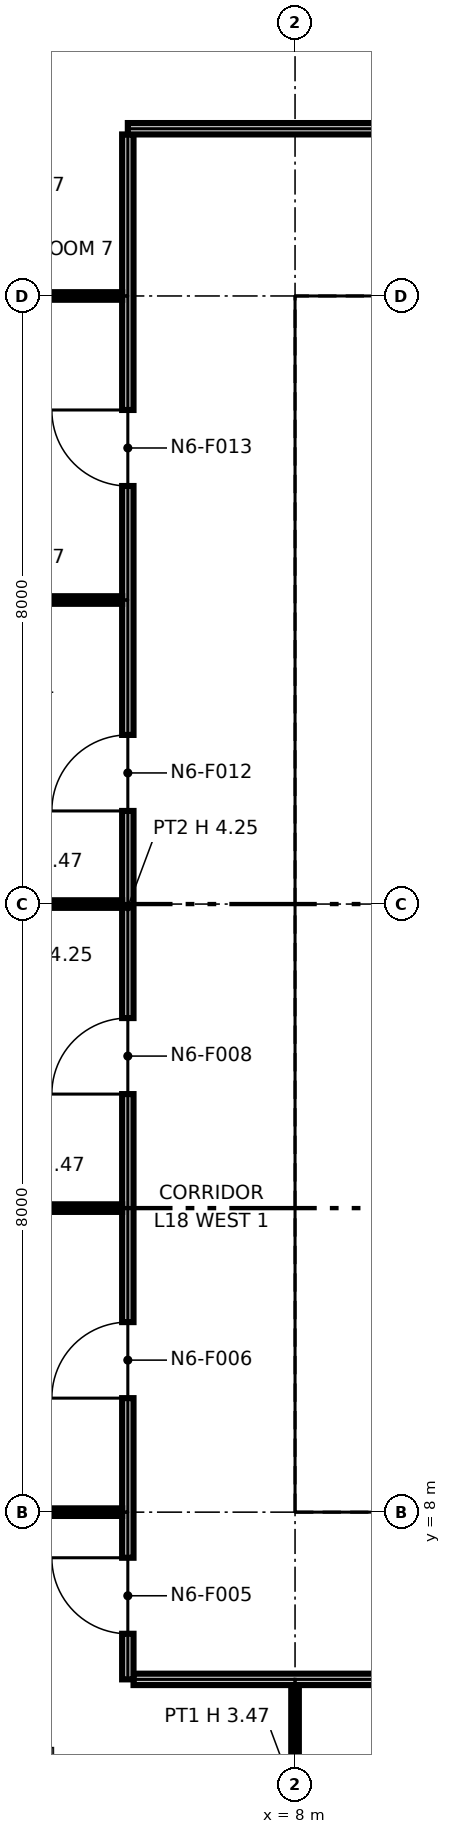
"""IFC4 building model, lengths in metres.
Left out: names, types, materials, properties, quantities, classifications, styles, units other than length and angle.
Written with IfcOpenShell. Run it as: python <this file> out.ifc"""

import sys

from ifc_helpers import new_model, si_unit, direction, frame, frame_2d, origin, origin_2d, place, context, subcontext, project, spatial, polyline, rectangle, i_section, outline, extrude, element, fill, save


model = new_model("IFC4")
c1 = context("Model", 3, precision=1e-05, world=origin(), true_north=direction((0.0, 1.0)))
c2 = subcontext(c1, "Body", "Model", "MODEL_VIEW")
j1 = project(units=[si_unit("LENGTHUNIT", "METRE"), si_unit("PLANEANGLEUNIT", "RADIAN")], contexts=[c1])
p1 = place(None, origin())
s1 = spatial("IfcSite", under=j1, at=p1, CompositionType="ELEMENT")
p2 = place(p1, origin())
s2 = spatial("IfcBuilding", under=s1, at=p2, CompositionType="ELEMENT")
p3 = place(p2, frame((0.0, 0.0, 96.4)))
s3 = spatial("IfcBuildingStorey", under=s2, at=p3, CompositionType="ELEMENT", Elevation=96.4)
for number, where, z_axis, x_axis in (
    (1, (8.0, 8.0, 0.0), (0.0, 0.0, 1.0), (1.0, 0.0, 0.0)),
    (2, (8.0, 16.0, 0.0), (0.0, 0.0, 1.0), (1.0, 0.0, 0.0)),
):
    element("IfcColumn", number, at=place(p3, frame(where, z_axis=z_axis, x_axis=x_axis)), inside=s3, PredefinedType="COLUMN", context=c2, shape_type="SweptSolid", body=[
        extrude(i_section(OverallWidth=0.406, OverallDepth=0.417, WebThickness=0.03, FlangeThickness=0.048, at=origin_2d()), origin(), (0.0, 0.0, 1.0), 4.25),
    ])
p4 = place(p3, frame((8.0, 24.0, 0.0), z_axis=(0.0, 0.0, 1.0), x_axis=(1.0, 0.0, 0.0)))
e3 = element("IfcColumn", 3, at=p4, inside=s3, PredefinedType="COLUMN", context=c2, shape_type="SweptSolid", body=[
    extrude(i_section(OverallWidth=0.411, OverallDepth=0.434, WebThickness=0.036, FlangeThickness=0.057, at=origin_2d()), origin(), (0.0, 0.0, 1.0), 4.25),
])
p5 = place(p3, frame((8.65, 8.75, 0.0), z_axis=(0.0, 0.0, 1.0), x_axis=(1.0, 0.0, 0.0)))
e4 = element("IfcWall", 4, at=p5, inside=s3, PredefinedType="PARTITIONING", context=c2, shape_type="SweptSolid", body=[
    extrude(outline(polyline([(0.0, 0.0), (14.7, 0.0), (14.7, 4.25), (7.469, 4.25), (7.469, 3.632), (7.231, 3.632), (7.23, 4.25), (0.0, 4.25), (0.0, 0.0)])), frame((0.0, 0.1, 0.0), z_axis=(0.0, -1.0, 0.0), x_axis=(1.0, 0.0, 0.0)), (0.0, 0.0, 1.0), 0.2),
])
p6 = place(p5, frame((1.3, 0.0, 0.0)))
e5 = element("IfcOpeningElement", 5, at=p6, cuts=e4, PredefinedType="OPENING", context=c2, shape_type="SweptSolid", body=[
    extrude(rectangle(XDim=1.4, YDim=2.1, at=frame_2d((0.7, 1.05))), frame((0.0, 0.11, 0.0), z_axis=(0.0, -1.0, 0.0), x_axis=(1.0, 0.0, 0.0)), (0.0, 0.0, 1.0), 0.22),
])
p7 = place(p5, frame((4.6, 0.0, 0.0)))
e6 = element("IfcOpeningElement", 6, at=p7, cuts=e4, PredefinedType="OPENING", context=c2, shape_type="SweptSolid", body=[
    extrude(rectangle(XDim=1.4, YDim=2.1, at=frame_2d((0.7, 1.05))), frame((0.0, 0.11, 0.0), z_axis=(0.0, -1.0, 0.0), x_axis=(1.0, 0.0, 0.0)), (0.0, 0.0, 1.0), 0.22),
])
p8 = place(p5, frame((10.4, 0.0, 0.0)))
e7 = element("IfcOpeningElement", 7, at=p8, cuts=e4, PredefinedType="OPENING", context=c2, shape_type="SweptSolid", body=[
    extrude(rectangle(XDim=1.2, YDim=2.1, at=frame_2d((0.6, 1.05))), frame((0.0, 0.11, 0.0), z_axis=(0.0, -1.0, 0.0), x_axis=(1.0, 0.0, 0.0)), (0.0, 0.0, 1.0), 0.22),
])
p9 = place(p3, frame((8.75, 8.85, 0.0), z_axis=(0.0, 0.0, 1.0), x_axis=(0.0, 1.0, 0.0)))
e8 = element("IfcWall", 8, at=p9, inside=s3, PredefinedType="PARTITIONING", context=c2, shape_type="SweptSolid", body=[
    extrude(outline(polyline([(0.0, 0.0), (14.3, 0.0), (14.3, 4.25), (10.231, 4.25), (10.23, 3.789), (10.07, 3.789), (10.069, 4.25), (7.27, 4.25), (7.269, 3.632), (7.031, 3.632), (7.031, 4.25), (0.0, 4.25), (0.0, 0.0)])), frame((0.0, 0.1, 0.0), z_axis=(0.0, -1.0, 0.0), x_axis=(1.0, 0.0, 0.0)), (0.0, 0.0, 1.0), 0.2),
])
p10 = place(p9, frame((8.3, 0.0, 0.0)))
e9 = element("IfcOpeningElement", 9, at=p10, cuts=e8, PredefinedType="OPENING", context=c2, shape_type="SweptSolid", body=[
    extrude(rectangle(XDim=1.8, YDim=2.1, at=frame_2d((0.9, 1.05))), frame((0.0, 0.11, 0.0), z_axis=(0.0, -1.0, 0.0), x_axis=(1.0, 0.0, 0.0)), (0.0, 0.0, 1.0), 0.22),
])
p11 = place(p3, frame((8.65, 23.25, 0.0), z_axis=(0.0, 0.0, 1.0), x_axis=(1.0, 0.0, 0.0)))
e10 = element("IfcWall", 10, at=p11, inside=s3, PredefinedType="PARTITIONING", context=c2, shape_type="SweptSolid", body=[
    extrude(outline(polyline([(0.0, 0.0), (14.7, 0.0), (14.7, 4.25), (7.469, 4.25), (7.469, 3.632), (7.231, 3.632), (7.23, 4.25), (0.0, 4.25), (0.0, 0.0)])), frame((0.0, 0.1, 0.0), z_axis=(0.0, -1.0, 0.0), x_axis=(1.0, 0.0, 0.0)), (0.0, 0.0, 1.0), 0.2),
])
p12 = place(p3, frame((8.85, 16.0, 0.0), z_axis=(0.0, 0.0, 1.0), x_axis=(1.0, 0.0, 0.0)))
e11 = element("IfcWall", 11, at=p12, inside=s3, PredefinedType="PARTITIONING", context=c2, shape_type="SweptSolid", body=[
    extrude(rectangle(XDim=6.931, YDim=0.6, at=frame_2d((3.466, 0.0))), origin(), (0.0, 0.0, 1.0), 3.632),
])
p13 = place(p3, frame((8.85, 19.9, 0.0), z_axis=(0.0, 0.0, 1.0), x_axis=(1.0, 0.0, 0.0)))
e12 = element("IfcWall", 12, at=p13, inside=s3, PredefinedType="PARTITIONING", context=c2, shape_type="SweptSolid", body=[
    extrude(outline(polyline([(0.0, 0.0), (14.3, 0.0), (14.3, 3.789), (7.27, 3.789), (7.269, 3.632), (7.031, 3.632), (7.031, 4.25), (0.0, 4.25), (0.0, 0.0)])), frame((0.0, 0.1, 0.0), z_axis=(0.0, -1.0, 0.0), x_axis=(1.0, 0.0, 0.0)), (0.0, 0.0, 1.0), 0.2),
])
p14 = place(p13, frame((6.35, 0.0, 0.0)))
e13 = element("IfcOpeningElement", 13, at=p14, cuts=e12, PredefinedType="OPENING", context=c2, shape_type="SweptSolid", body=[
    extrude(rectangle(XDim=0.9, YDim=2.1, at=frame_2d((0.45, 1.05))), frame((0.0, 0.11, 0.0), z_axis=(0.0, -1.0, 0.0), x_axis=(1.0, 0.0, 0.0)), (0.0, 0.0, 1.0), 0.22),
])
p15 = place(p13, frame((9.0, 0.0, 0.0)))
e14 = element("IfcOpeningElement", 14, at=p15, cuts=e12, PredefinedType="OPENING", context=c2, shape_type="SweptSolid", body=[
    extrude(rectangle(XDim=0.9, YDim=2.1, at=frame_2d((0.45, 1.05))), frame((0.0, 0.11, 0.0), z_axis=(0.0, -1.0, 0.0), x_axis=(1.0, 0.0, 0.0)), (0.0, 0.0, 1.0), 0.22),
])
p16 = place(p13, frame((11.35, 0.0, 0.0)))
e15 = element("IfcOpeningElement", 15, at=p16, cuts=e12, PredefinedType="OPENING", context=c2, shape_type="SweptSolid", body=[
    extrude(rectangle(XDim=1.0, YDim=2.1, at=frame_2d((0.5, 1.05))), frame((0.0, 0.11, 0.0), z_axis=(0.0, -1.0, 0.0), x_axis=(1.0, 0.0, 0.0)), (0.0, 0.0, 1.0), 0.22),
])
p17 = place(p13, frame((13.125, 0.0, 0.0)))
e16 = element("IfcOpeningElement", 16, at=p17, cuts=e12, PredefinedType="OPENING", context=c2, shape_type="SweptSolid", body=[
    extrude(rectangle(XDim=0.9, YDim=2.1, at=frame_2d((0.45, 1.05))), frame((0.0, 0.11, 0.0), z_axis=(0.0, -1.0, 0.0), x_axis=(1.0, 0.0, 0.0)), (0.0, 0.0, 1.0), 0.22),
])
p18 = place(p3, frame((8.0, 2.83, 0.0), z_axis=(0.0, 0.0, 1.0), x_axis=(0.0, 1.0, 0.0)))
e17 = element("IfcWall", 17, at=p18, inside=s3, PredefinedType="PARTITIONING", context=c2, shape_type="SweptSolid", body=[
    extrude(rectangle(XDim=2.895, YDim=0.1, at=frame_2d((1.448, 0.0))), origin(), (0.0, 0.0, 1.0), 3.47),
])
p19 = place(p3, frame((5.875, 5.8, 0.0), z_axis=(0.0, 0.0, 1.0), x_axis=(1.0, 0.0, 0.0)))
e18 = element("IfcWall", 18, at=p19, inside=s3, PredefinedType="PARTITIONING", context=c2, shape_type="SweptSolid", body=[
    extrude(rectangle(XDim=20.25, YDim=0.15, at=frame_2d((10.125, 0.0))), origin(), (0.0, 0.0, 1.0), 4.25),
])
p20 = place(p19, frame((14.625, 0.0, 0.0), z_axis=(0.0, 0.0, 1.0), x_axis=(-1.0, 0.0, 0.0)))
e19 = element("IfcOpeningElement", 19, at=p20, cuts=e18, PredefinedType="OPENING", context=c2, shape_type="SweptSolid", body=[
    extrude(rectangle(XDim=1.0, YDim=2.1, at=frame_2d((0.5, 1.05))), frame((0.0, 0.085, 0.0), z_axis=(0.0, -1.0, 0.0), x_axis=(1.0, 0.0, 0.0)), (0.0, 0.0, 1.0), 0.17),
])
p21 = place(p19, frame((4.625, 0.0, 0.0), z_axis=(0.0, 0.0, 1.0), x_axis=(-1.0, 0.0, 0.0)))
e20 = element("IfcOpeningElement", 20, at=p21, cuts=e18, PredefinedType="OPENING", context=c2, shape_type="SweptSolid", body=[
    extrude(rectangle(XDim=1.0, YDim=2.1, at=frame_2d((0.5, 1.05))), frame((0.0, 0.085, 0.0), z_axis=(0.0, -1.0, 0.0), x_axis=(1.0, 0.0, 0.0)), (0.0, 0.0, 1.0), 0.17),
])
p22 = place(p19, frame((8.625, 0.0, 0.0), z_axis=(0.0, 0.0, 1.0), x_axis=(-1.0, 0.0, 0.0)))
e21 = element("IfcOpeningElement", 21, at=p22, cuts=e18, PredefinedType="OPENING", context=c2, shape_type="SweptSolid", body=[
    extrude(rectangle(XDim=1.0, YDim=2.1, at=frame_2d((0.5, 1.05))), frame((0.0, 0.085, 0.0), z_axis=(0.0, -1.0, 0.0), x_axis=(1.0, 0.0, 0.0)), (0.0, 0.0, 1.0), 0.17),
])
p23 = place(p3, frame((5.8, 5.8, 0.0), z_axis=(0.0, 0.0, 1.0), x_axis=(0.0, 1.0, 0.0)))
e22 = element("IfcWall", 22, at=p23, inside=s3, PredefinedType="PARTITIONING", context=c2, shape_type="SweptSolid", body=[
    extrude(outline(polyline([(0.0, 0.0), (20.325, 0.0), (20.325, 4.25), (18.5, 4.25), (18.498, 3.47), (17.902, 3.47), (17.9, 4.25), (14.5, 4.25), (14.498, 3.47), (13.902, 3.47), (13.9, 4.25), (10.5, 4.25), (10.498, 3.47), (9.902, 3.47), (9.9, 4.25), (6.5, 4.25), (6.498, 3.47), (5.902, 3.47), (5.9, 4.25), (2.5, 4.25), (2.498, 3.47), (1.902, 3.47), (1.9, 4.25), (0.0, 4.25), (0.0, 0.0)])), frame((0.0, 0.075, 0.0), z_axis=(0.0, -1.0, 0.0), x_axis=(1.0, 0.0, 0.0)), (0.0, 0.0, 1.0), 0.15),
])
p24 = place(p23, frame((0.6, 0.0, 0.0)))
e23 = element("IfcOpeningElement", 23, at=p24, cuts=e22, PredefinedType="OPENING", context=c2, shape_type="SweptSolid", body=[
    extrude(rectangle(XDim=1.0, YDim=2.1, at=frame_2d((0.5, 1.05))), frame((0.0, 0.085, 0.0), z_axis=(0.0, -1.0, 0.0), x_axis=(1.0, 0.0, 0.0)), (0.0, 0.0, 1.0), 0.17),
])
p25 = place(p23, frame((3.7, 0.0, 0.0)))
e24 = element("IfcOpeningElement", 24, at=p25, cuts=e22, PredefinedType="OPENING", context=c2, shape_type="SweptSolid", body=[
    extrude(rectangle(XDim=1.0, YDim=2.1, at=frame_2d((0.5, 1.05))), frame((0.0, 0.085, 0.0), z_axis=(0.0, -1.0, 0.0), x_axis=(1.0, 0.0, 0.0)), (0.0, 0.0, 1.0), 0.17),
])
p26 = place(p23, frame((7.7, 0.0, 0.0)))
e25 = element("IfcOpeningElement", 25, at=p26, cuts=e22, PredefinedType="OPENING", context=c2, shape_type="SweptSolid", body=[
    extrude(rectangle(XDim=1.0, YDim=2.1, at=frame_2d((0.5, 1.05))), frame((0.0, 0.085, 0.0), z_axis=(0.0, -1.0, 0.0), x_axis=(1.0, 0.0, 0.0)), (0.0, 0.0, 1.0), 0.17),
])
p27 = place(p23, frame((11.425, 0.0, 0.0)))
e26 = element("IfcOpeningElement", 26, at=p27, cuts=e22, PredefinedType="OPENING", context=c2, shape_type="SweptSolid", body=[
    extrude(rectangle(XDim=1.0, YDim=2.1, at=frame_2d((0.5, 1.05))), frame((0.0, 0.085, 0.0), z_axis=(0.0, -1.0, 0.0), x_axis=(1.0, 0.0, 0.0)), (0.0, 0.0, 1.0), 0.17),
])
p28 = place(p23, frame((15.7, 0.0, 0.0)))
e27 = element("IfcOpeningElement", 27, at=p28, cuts=e22, PredefinedType="OPENING", context=c2, shape_type="SweptSolid", body=[
    extrude(rectangle(XDim=1.0, YDim=2.1, at=frame_2d((0.5, 1.05))), frame((0.0, 0.085, 0.0), z_axis=(0.0, -1.0, 0.0), x_axis=(1.0, 0.0, 0.0)), (0.0, 0.0, 1.0), 0.17),
])
p29 = place(p3, frame((2.35, 8.0, 0.0), z_axis=(0.0, 0.0, 1.0), x_axis=(1.0, 0.0, 0.0)))
e28 = element("IfcWall", 28, at=p29, inside=s3, PredefinedType="PARTITIONING", context=c2, shape_type="SweptSolid", body=[
    extrude(rectangle(XDim=3.375, YDim=0.1, at=frame_2d((1.688, 0.0))), origin(), (0.0, 0.0, 1.0), 3.47),
])
p30 = place(p3, frame((3.35, 12.0, 0.0), z_axis=(0.0, 0.0, 1.0), x_axis=(1.0, 0.0, 0.0)))
e29 = element("IfcWall", 29, at=p30, inside=s3, PredefinedType="PARTITIONING", context=c2, shape_type="SweptSolid", body=[
    extrude(rectangle(XDim=2.375, YDim=0.1, at=frame_2d((1.188, 0.0))), origin(), (0.0, 0.0, 1.0), 3.47),
])
p31 = place(p3, frame((3.3, 16.0, 0.0), z_axis=(0.0, 0.0, 1.0), x_axis=(1.0, 0.0, 0.0)))
e30 = element("IfcWall", 30, at=p31, inside=s3, PredefinedType="PARTITIONING", context=c2, shape_type="SweptSolid", body=[
    extrude(rectangle(XDim=2.425, YDim=0.1, at=frame_2d((1.212, 0.0))), origin(), (0.0, 0.0, 1.0), 3.47),
])
for number, where, z_axis, x_axis in (
    (31, (2.83, 20.0, 0.0), (0.0, 0.0, 1.0), (1.0, 0.0, 0.0)),
    (32, (2.83, 24.0, 0.0), (0.0, 0.0, 1.0), (1.0, 0.0, 0.0)),
):
    element("IfcWall", number, at=place(p3, frame(where, z_axis=z_axis, x_axis=x_axis)), inside=s3, PredefinedType="PARTITIONING", context=c2, shape_type="SweptSolid", body=[
        extrude(rectangle(XDim=2.895, YDim=0.1, at=frame_2d((1.448, 0.0))), origin(), (0.0, 0.0, 1.0), 3.47),
    ])
p32 = place(p3, frame((5.8, 26.2, 0.0), z_axis=(0.0, 0.0, 1.0), x_axis=(1.0, 0.0, 0.0)))
e33 = element("IfcWall", 33, at=p32, inside=s3, PredefinedType="PARTITIONING", context=c2, shape_type="SweptSolid", body=[
    extrude(rectangle(XDim=18.125, YDim=0.15, at=frame_2d((9.062, 0.0))), origin(), (0.0, 0.0, 1.0), 4.25),
])
p33 = place(p32, frame((13.7, 0.0, 0.0)))
e34 = element("IfcOpeningElement", 34, at=p33, cuts=e33, PredefinedType="OPENING", context=c2, shape_type="SweptSolid", body=[
    extrude(rectangle(XDim=1.0, YDim=2.1, at=frame_2d((0.5, 1.05))), frame((0.0, 0.085, 0.0), z_axis=(0.0, -1.0, 0.0), x_axis=(1.0, 0.0, 0.0)), (0.0, 0.0, 1.0), 0.17),
])
p34 = place(p32, frame((5.3, 0.0, 0.0)))
e35 = element("IfcOpeningElement", 35, at=p34, cuts=e33, PredefinedType="OPENING", context=c2, shape_type="SweptSolid", body=[
    extrude(rectangle(XDim=1.8, YDim=2.1, at=frame_2d((0.9, 1.05))), frame((0.0, 0.085, 0.0), z_axis=(0.0, -1.0, 0.0), x_axis=(1.0, 0.0, 0.0)), (0.0, 0.0, 1.0), 0.17),
])
p35 = place(p10, origin())
e36 = element("IfcDoor", 36, at=p35, inside=s3, OperationType="DOUBLE_DOOR_SINGLE_SWING", PredefinedType="NOTDEFINED", context=c2, shape_type="SweptSolid", body=[
    extrude(rectangle(XDim=1.8, YDim=2.1, at=frame_2d((0.9, 1.05))), frame((0.0, 0.025, 0.0), z_axis=(0.0, -1.0, 0.0), x_axis=(1.0, 0.0, 0.0)), (0.0, 0.0, 1.0), 0.05),
])
fill(e9, e36)
p36 = place(p24, origin())
e37 = element("IfcDoor", 37, at=p36, inside=s3, OperationType="SINGLE_SWING_RIGHT", PredefinedType="DOOR", context=c2, shape_type="SweptSolid", body=[
    extrude(rectangle(XDim=1.0, YDim=2.1, at=frame_2d((0.5, 1.05))), frame((0.0, 0.025, 0.0), z_axis=(0.0, -1.0, 0.0), x_axis=(1.0, 0.0, 0.0)), (0.0, 0.0, 1.0), 0.05),
])
fill(e23, e37)
p37 = place(p25, origin())
e38 = element("IfcDoor", 38, at=p37, inside=s3, OperationType="SINGLE_SWING_LEFT", PredefinedType="DOOR", context=c2, shape_type="SweptSolid", body=[
    extrude(rectangle(XDim=1.0, YDim=2.1, at=frame_2d((0.5, 1.05))), frame((0.0, 0.025, 0.0), z_axis=(0.0, -1.0, 0.0), x_axis=(1.0, 0.0, 0.0)), (0.0, 0.0, 1.0), 0.05),
])
fill(e24, e38)
p38 = place(p26, origin())
e39 = element("IfcDoor", 39, at=p38, inside=s3, OperationType="SINGLE_SWING_LEFT", PredefinedType="DOOR", context=c2, shape_type="SweptSolid", body=[
    extrude(rectangle(XDim=1.0, YDim=2.1, at=frame_2d((0.5, 1.05))), frame((0.0, 0.025, 0.0), z_axis=(0.0, -1.0, 0.0), x_axis=(1.0, 0.0, 0.0)), (0.0, 0.0, 1.0), 0.05),
])
fill(e25, e39)
p39 = place(p27, origin())
e40 = element("IfcDoor", 40, at=p39, inside=s3, OperationType="SINGLE_SWING_LEFT", PredefinedType="DOOR", context=c2, shape_type="SweptSolid", body=[
    extrude(rectangle(XDim=1.0, YDim=2.1, at=frame_2d((0.5, 1.05))), frame((0.0, 0.025, 0.0), z_axis=(0.0, -1.0, 0.0), x_axis=(1.0, 0.0, 0.0)), (0.0, 0.0, 1.0), 0.05),
])
fill(e26, e40)
p40 = place(p28, origin())
e41 = element("IfcDoor", 41, at=p40, inside=s3, OperationType="SINGLE_SWING_RIGHT", PredefinedType="DOOR", context=c2, shape_type="SweptSolid", body=[
    extrude(rectangle(XDim=1.0, YDim=2.1, at=frame_2d((0.5, 1.05))), frame((0.0, 0.025, 0.0), z_axis=(0.0, -1.0, 0.0), x_axis=(1.0, 0.0, 0.0)), (0.0, 0.0, 1.0), 0.05),
])
fill(e27, e41)
save(model, sys.argv[1])
